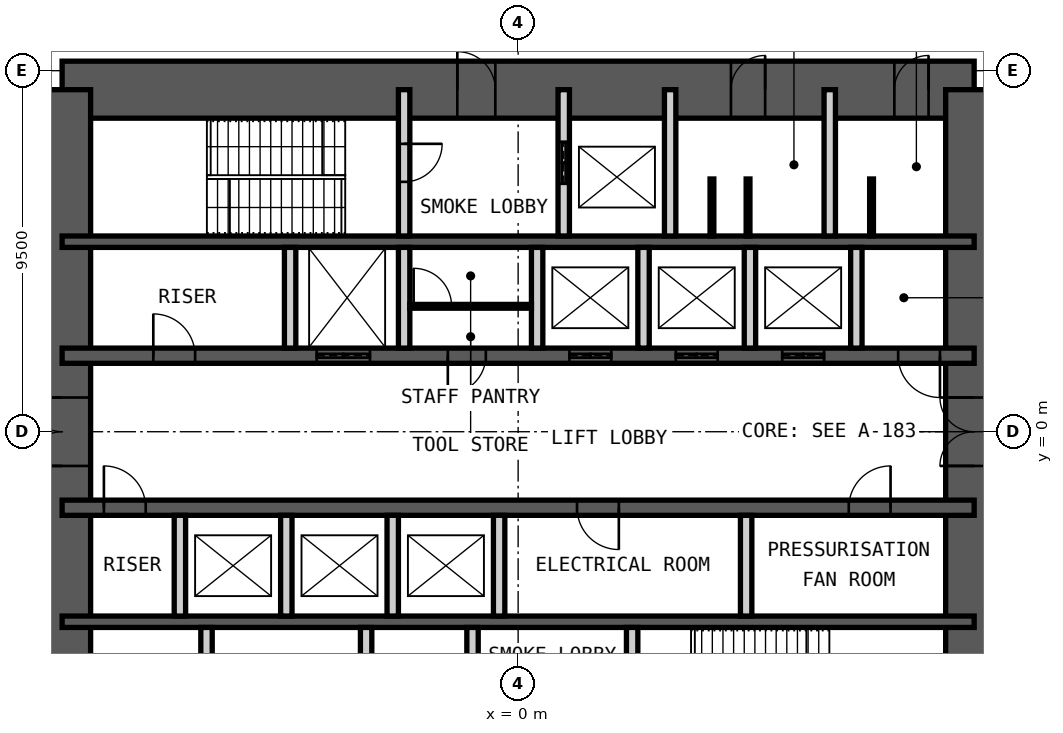
"""IFC4 building model, lengths in metres.
Left out: names, types, materials, properties, quantities, classifications, styles, units other than length and angle.
Written with IfcOpenShell. Run it as: python <this file> out.ifc"""

import sys

from ifc_helpers import new_model, si_unit, direction, frame, frame_2d, origin, place, context, subcontext, project, spatial, rectangle, extrude, element, fill, save


model = new_model("IFC4")
c1 = context("Model", 3, precision=1e-05, world=origin(), true_north=direction((0.0, 1.0)))
c2 = subcontext(c1, "Body", "Model", "MODEL_VIEW")
j1 = project(units=[si_unit("LENGTHUNIT", "METRE"), si_unit("PLANEANGLEUNIT", "RADIAN")], contexts=[c1])
p1 = place(None, origin())
s1 = spatial("IfcSite", under=j1, at=p1, CompositionType="ELEMENT")
p2 = place(p1, origin())
s2 = spatial("IfcBuilding", under=s1, at=p2, CompositionType="ELEMENT")
p3 = place(p2, frame((0.0, 0.0, 37.0)))
s3 = spatial("IfcBuildingStorey", under=s2, at=p3, CompositionType="ELEMENT", Elevation=37.0)
p4 = place(p3, frame((-12.0, 9.0, 0.0), z_axis=(0.0, 0.0, 1.0), x_axis=(1.0, 0.0, 0.0)))
e1 = element("IfcWall", 1, at=p4, inside=s3, PredefinedType="SHEAR", context=c2, shape_type="SweptSolid", body=[
    extrude(rectangle(XDim=24.0, YDim=1.5, at=frame_2d((12.0, 0.0))), origin(), (0.0, 0.0, 1.0), 5.0),
])
p5 = place(p4, frame((10.4, 0.0, 0.0)))
e2 = element("IfcOpeningElement", 2, at=p5, cuts=e1, PredefinedType="OPENING", context=c2, shape_type="SweptSolid", body=[
    extrude(rectangle(XDim=1.0, YDim=2.1, at=frame_2d((0.5, 1.05))), frame((0.0, 0.76, 0.0), z_axis=(0.0, -1.0, 0.0), x_axis=(1.0, 0.0, 0.0)), (0.0, 0.0, 1.0), 1.52),
])
p6 = place(p4, frame((17.6, 0.0, 0.0)))
e3 = element("IfcOpeningElement", 3, at=p6, cuts=e1, PredefinedType="OPENING", context=c2, shape_type="SweptSolid", body=[
    extrude(rectangle(XDim=0.9, YDim=2.1, at=frame_2d((0.45, 1.05))), frame((0.0, 0.76, 0.0), z_axis=(0.0, -1.0, 0.0), x_axis=(1.0, 0.0, 0.0)), (0.0, 0.0, 1.0), 1.52),
])
p7 = place(p4, frame((21.9, 0.0, 0.0)))
e4 = element("IfcOpeningElement", 4, at=p7, cuts=e1, PredefinedType="OPENING", context=c2, shape_type="SweptSolid", body=[
    extrude(rectangle(XDim=0.9, YDim=2.1, at=frame_2d((0.45, 1.05))), frame((0.0, 0.76, 0.0), z_axis=(0.0, -1.0, 0.0), x_axis=(1.0, 0.0, 0.0)), (0.0, 0.0, 1.0), 1.52),
])
p8 = place(p3, frame((12.0, -9.0, 0.0), z_axis=(0.0, 0.0, 1.0), x_axis=(0.0, 1.0, 0.0)))
e5 = element("IfcWall", 5, at=p8, inside=s3, PredefinedType="SHEAR", context=c2, shape_type="SweptSolid", body=[
    extrude(rectangle(XDim=18.0, YDim=1.5, at=frame_2d((9.0, 0.0))), origin(), (0.0, 0.0, 1.0), 5.0),
])
p9 = place(p8, frame((8.1, 0.0, 0.0)))
e6 = element("IfcOpeningElement", 6, at=p9, cuts=e5, PredefinedType="OPENING", context=c2, shape_type="SweptSolid", body=[
    extrude(rectangle(XDim=1.8, YDim=2.1, at=frame_2d((0.9, 1.05))), frame((0.0, 0.76, 0.0), z_axis=(0.0, -1.0, 0.0), x_axis=(1.0, 0.0, 0.0)), (0.0, 0.0, 1.0), 1.52),
])
p10 = place(p3, frame((-12.0, -9.0, 0.0), z_axis=(0.0, 0.0, 1.0), x_axis=(0.0, 1.0, 0.0)))
e7 = element("IfcWall", 7, at=p10, inside=s3, PredefinedType="SHEAR", context=c2, shape_type="SweptSolid", body=[
    extrude(rectangle(XDim=18.0, YDim=1.5, at=frame_2d((9.0, 0.0))), origin(), (0.0, 0.0, 1.0), 5.0),
])
p11 = place(p10, frame((8.1, 0.0, 0.0)))
e8 = element("IfcOpeningElement", 8, at=p11, cuts=e7, PredefinedType="OPENING", context=c2, shape_type="SweptSolid", body=[
    extrude(rectangle(XDim=1.8, YDim=2.1, at=frame_2d((0.9, 1.05))), frame((0.0, 0.76, 0.0), z_axis=(0.0, -1.0, 0.0), x_axis=(1.0, 0.0, 0.0)), (0.0, 0.0, 1.0), 1.52),
])
p12 = place(p3, frame((-12.0, 5.0, 0.0), z_axis=(0.0, 0.0, 1.0), x_axis=(1.0, 0.0, 0.0)))
e9 = element("IfcWall", 9, at=p12, inside=s3, PredefinedType="SHEAR", context=c2, shape_type="SweptSolid", body=[
    extrude(rectangle(XDim=24.0, YDim=0.3, at=frame_2d((12.0, 0.0))), origin(), (0.0, 0.0, 1.0), 5.0),
])
p13 = place(p3, frame((-12.0, 2.0, 0.0), z_axis=(0.0, 0.0, 1.0), x_axis=(1.0, 0.0, 0.0)))
e10 = element("IfcWall", 10, at=p13, inside=s3, PredefinedType="SHEAR", context=c2, shape_type="SweptSolid", body=[
    extrude(rectangle(XDim=24.0, YDim=0.4, at=frame_2d((12.0, 0.0))), origin(), (0.0, 0.0, 1.0), 5.0),
])
p14 = place(p13, frame((2.4, 0.0, 0.0)))
e11 = element("IfcOpeningElement", 11, at=p14, cuts=e10, PredefinedType="OPENING", context=c2, shape_type="SweptSolid", body=[
    extrude(rectangle(XDim=1.1, YDim=2.1, at=frame_2d((0.55, 1.05))), frame((0.0, 0.21, 0.0), z_axis=(0.0, -1.0, 0.0), x_axis=(1.0, 0.0, 0.0)), (0.0, 0.0, 1.0), 0.42),
])
p15 = place(p13, frame((22.0, 0.0, 0.0)))
e12 = element("IfcOpeningElement", 12, at=p15, cuts=e10, PredefinedType="OPENING", context=c2, shape_type="SweptSolid", body=[
    extrude(rectangle(XDim=1.1, YDim=2.1, at=frame_2d((0.55, 1.05))), frame((0.0, 0.21, 0.0), z_axis=(0.0, -1.0, 0.0), x_axis=(1.0, 0.0, 0.0)), (0.0, 0.0, 1.0), 0.42),
])
p16 = place(p13, frame((10.15, 0.0, 0.0)))
e13 = element("IfcOpeningElement", 13, at=p16, cuts=e10, PredefinedType="OPENING", context=c2, shape_type="SweptSolid", body=[
    extrude(rectangle(XDim=1.0, YDim=2.1, at=frame_2d((0.5, 1.05))), frame((0.0, 0.21, 0.0), z_axis=(0.0, -1.0, 0.0), x_axis=(1.0, 0.0, 0.0)), (0.0, 0.0, 1.0), 0.42),
])
p17 = place(p13, frame((6.7, 0.0, 0.0)))
e14 = element("IfcOpeningElement", 14, at=p17, cuts=e10, PredefinedType="OPENING", context=c2, shape_type="SweptSolid", body=[
    extrude(rectangle(XDim=1.4, YDim=2.4, at=frame_2d((0.7, 1.2))), frame((0.0, 0.21, 0.0), z_axis=(0.0, -1.0, 0.0), x_axis=(1.0, 0.0, 0.0)), (0.0, 0.0, 1.0), 0.42),
])
p18 = place(p13, frame((13.35, 0.0, 0.0)))
e15 = element("IfcOpeningElement", 15, at=p18, cuts=e10, PredefinedType="OPENING", context=c2, shape_type="SweptSolid", body=[
    extrude(rectangle(XDim=1.1, YDim=2.4, at=frame_2d((0.55, 1.2))), frame((0.0, 0.21, 0.0), z_axis=(0.0, -1.0, 0.0), x_axis=(1.0, 0.0, 0.0)), (0.0, 0.0, 1.0), 0.42),
])
p19 = place(p13, frame((16.15, 0.0, 0.0)))
e16 = element("IfcOpeningElement", 16, at=p19, cuts=e10, PredefinedType="OPENING", context=c2, shape_type="SweptSolid", body=[
    extrude(rectangle(XDim=1.1, YDim=2.4, at=frame_2d((0.55, 1.2))), frame((0.0, 0.21, 0.0), z_axis=(0.0, -1.0, 0.0), x_axis=(1.0, 0.0, 0.0)), (0.0, 0.0, 1.0), 0.42),
])
p20 = place(p13, frame((18.95, 0.0, 0.0)))
e17 = element("IfcOpeningElement", 17, at=p20, cuts=e10, PredefinedType="OPENING", context=c2, shape_type="SweptSolid", body=[
    extrude(rectangle(XDim=1.1, YDim=2.4, at=frame_2d((0.55, 1.2))), frame((0.0, 0.21, 0.0), z_axis=(0.0, -1.0, 0.0), x_axis=(1.0, 0.0, 0.0)), (0.0, 0.0, 1.0), 0.42),
])
p21 = place(p3, frame((-12.0, -2.0, 0.0), z_axis=(0.0, 0.0, 1.0), x_axis=(1.0, 0.0, 0.0)))
e18 = element("IfcWall", 18, at=p21, inside=s3, PredefinedType="SHEAR", context=c2, shape_type="SweptSolid", body=[
    extrude(rectangle(XDim=24.0, YDim=0.4, at=frame_2d((12.0, 0.0))), origin(), (0.0, 0.0, 1.0), 5.0),
])
p22 = place(p21, frame((1.1, 0.0, 0.0)))
e19 = element("IfcOpeningElement", 19, at=p22, cuts=e18, PredefinedType="OPENING", context=c2, shape_type="SweptSolid", body=[
    extrude(rectangle(XDim=1.1, YDim=2.1, at=frame_2d((0.55, 1.05))), frame((0.0, 0.21, 0.0), z_axis=(0.0, -1.0, 0.0), x_axis=(1.0, 0.0, 0.0)), (0.0, 0.0, 1.0), 0.42),
])
p23 = place(p21, frame((13.55, 0.0, 0.0)))
e20 = element("IfcOpeningElement", 20, at=p23, cuts=e18, PredefinedType="OPENING", context=c2, shape_type="SweptSolid", body=[
    extrude(rectangle(XDim=1.1, YDim=2.1, at=frame_2d((0.55, 1.05))), frame((0.0, 0.21, 0.0), z_axis=(0.0, -1.0, 0.0), x_axis=(1.0, 0.0, 0.0)), (0.0, 0.0, 1.0), 0.42),
])
p24 = place(p21, frame((20.7, 0.0, 0.0)))
e21 = element("IfcOpeningElement", 21, at=p24, cuts=e18, PredefinedType="OPENING", context=c2, shape_type="SweptSolid", body=[
    extrude(rectangle(XDim=1.1, YDim=2.1, at=frame_2d((0.55, 1.05))), frame((0.0, 0.21, 0.0), z_axis=(0.0, -1.0, 0.0), x_axis=(1.0, 0.0, 0.0)), (0.0, 0.0, 1.0), 0.42),
])
p25 = place(p3, frame((-12.0, -5.0, 0.0), z_axis=(0.0, 0.0, 1.0), x_axis=(1.0, 0.0, 0.0)))
e22 = element("IfcWall", 22, at=p25, inside=s3, PredefinedType="SHEAR", context=c2, shape_type="SweptSolid", body=[
    extrude(rectangle(XDim=24.0, YDim=0.3, at=frame_2d((12.0, 0.0))), origin(), (0.0, 0.0, 1.0), 5.0),
])
p26 = place(p3, frame((-3.0, 5.15, 0.0), z_axis=(0.0, 0.0, 1.0), x_axis=(0.0, 1.0, 0.0)))
e23 = element("IfcWall", 23, at=p26, inside=s3, PredefinedType="PARTITIONING", context=c2, shape_type="SweptSolid", body=[
    extrude(rectangle(XDim=3.85, YDim=0.3, at=frame_2d((1.925, 0.0))), origin(), (0.0, 0.0, 1.0), 4.78),
])
p27 = place(p26, frame((1.425, 0.0, 0.0)))
e24 = element("IfcOpeningElement", 24, at=p27, cuts=e23, PredefinedType="OPENING", context=c2, shape_type="SweptSolid", body=[
    extrude(rectangle(XDim=1.0, YDim=2.1, at=frame_2d((0.5, 1.05))), frame((0.0, 0.16, 0.0), z_axis=(0.0, -1.0, 0.0), x_axis=(1.0, 0.0, 0.0)), (0.0, 0.0, 1.0), 0.32),
])
p28 = place(p3, frame((1.2, 5.15, 0.0), z_axis=(0.0, 0.0, 1.0), x_axis=(0.0, 1.0, 0.0)))
e25 = element("IfcWall", 25, at=p28, inside=s3, PredefinedType="PARTITIONING", context=c2, shape_type="SweptSolid", body=[
    extrude(rectangle(XDim=3.85, YDim=0.3, at=frame_2d((1.925, 0.0))), origin(), (0.0, 0.0, 1.0), 4.78),
])
p29 = place(p28, frame((1.375, 0.0, 0.0)))
e26 = element("IfcOpeningElement", 26, at=p29, cuts=e25, PredefinedType="OPENING", context=c2, shape_type="SweptSolid", body=[
    extrude(rectangle(XDim=1.1, YDim=2.4, at=frame_2d((0.55, 1.2))), frame((0.0, 0.16, 0.0), z_axis=(0.0, -1.0, 0.0), x_axis=(1.0, 0.0, 0.0)), (0.0, 0.0, 1.0), 0.32),
])
for number, where, z_axis, x_axis in (
    (27, (4.0, 5.15, 0.0), (0.0, 0.0, 1.0), (0.0, 1.0, 0.0)),
    (28, (8.2, 5.15, 0.0), (0.0, 0.0, 1.0), (0.0, 1.0, 0.0)),
):
    element("IfcWall", number, at=place(p3, frame(where, z_axis=z_axis, x_axis=x_axis)), inside=s3, PredefinedType="PARTITIONING", context=c2, shape_type="SweptSolid", body=[
        extrude(rectangle(XDim=3.85, YDim=0.3, at=frame_2d((1.925, 0.0))), origin(), (0.0, 0.0, 1.0), 4.78),
    ])
for number, where, z_axis, x_axis in (
    (29, (-6.0, 2.2, 0.0), (0.0, 0.0, 1.0), (0.0, 1.0, 0.0)),
    (30, (-3.0, 2.2, 0.0), (0.0, 0.0, 1.0), (0.0, 1.0, 0.0)),
    (31, (0.5, 2.2, 0.0), (0.0, 0.0, 1.0), (0.0, 1.0, 0.0)),
    (32, (3.3, 2.2, 0.0), (0.0, 0.0, 1.0), (0.0, 1.0, 0.0)),
    (33, (6.1, 2.2, 0.0), (0.0, 0.0, 1.0), (0.0, 1.0, 0.0)),
    (34, (8.9, 2.2, 0.0), (0.0, 0.0, 1.0), (0.0, 1.0, 0.0)),
    (35, (-8.9, -4.85, 0.0), (0.0, 0.0, 1.0), (0.0, 1.0, 0.0)),
    (36, (-6.1, -4.85, 0.0), (0.0, 0.0, 1.0), (0.0, 1.0, 0.0)),
    (37, (-3.3, -4.85, 0.0), (0.0, 0.0, 1.0), (0.0, 1.0, 0.0)),
    (38, (-0.5, -4.85, 0.0), (0.0, 0.0, 1.0), (0.0, 1.0, 0.0)),
    (39, (6.0, -4.85, 0.0), (0.0, 0.0, 1.0), (0.0, 1.0, 0.0)),
):
    element("IfcWall", number, at=place(p3, frame(where, z_axis=z_axis, x_axis=x_axis)), inside=s3, PredefinedType="PARTITIONING", context=c2, shape_type="SweptSolid", body=[
        extrude(rectangle(XDim=2.65, YDim=0.3, at=frame_2d((1.325, 0.0))), origin(), (0.0, 0.0, 1.0), 4.78),
    ])
for number, where, z_axis, x_axis in (
    (40, (-8.2, -9.0, 0.0), (0.0, 0.0, 1.0), (0.0, 1.0, 0.0)),
    (41, (-4.0, -9.0, 0.0), (0.0, 0.0, 1.0), (0.0, 1.0, 0.0)),
):
    element("IfcWall", number, at=place(p3, frame(where, z_axis=z_axis, x_axis=x_axis)), inside=s3, PredefinedType="PARTITIONING", context=c2, shape_type="SweptSolid", body=[
        extrude(rectangle(XDim=3.85, YDim=0.3, at=frame_2d((1.925, 0.0))), origin(), (0.0, 0.0, 1.0), 4.78),
    ])
p30 = place(p3, frame((-1.2, -9.0, 0.0), z_axis=(0.0, 0.0, 1.0), x_axis=(0.0, 1.0, 0.0)))
e42 = element("IfcWall", 42, at=p30, inside=s3, PredefinedType="PARTITIONING", context=c2, shape_type="SweptSolid", body=[
    extrude(rectangle(XDim=3.85, YDim=0.3, at=frame_2d((1.925, 0.0))), origin(), (0.0, 0.0, 1.0), 4.78),
])
p31 = place(p30, frame((1.375, 0.0, 0.0)))
e43 = element("IfcOpeningElement", 43, at=p31, cuts=e42, PredefinedType="OPENING", context=c2, shape_type="SweptSolid", body=[
    extrude(rectangle(XDim=1.1, YDim=2.4, at=frame_2d((0.55, 1.2))), frame((0.0, 0.16, 0.0), z_axis=(0.0, -1.0, 0.0), x_axis=(1.0, 0.0, 0.0)), (0.0, 0.0, 1.0), 0.32),
])
p32 = place(p3, frame((3.0, -9.0, 0.0), z_axis=(0.0, 0.0, 1.0), x_axis=(0.0, 1.0, 0.0)))
e44 = element("IfcWall", 44, at=p32, inside=s3, PredefinedType="PARTITIONING", context=c2, shape_type="SweptSolid", body=[
    extrude(rectangle(XDim=3.85, YDim=0.3, at=frame_2d((1.925, 0.0))), origin(), (0.0, 0.0, 1.0), 4.78),
])
p33 = place(p32, frame((1.425, 0.0, 0.0)))
e45 = element("IfcOpeningElement", 45, at=p33, cuts=e44, PredefinedType="OPENING", context=c2, shape_type="SweptSolid", body=[
    extrude(rectangle(XDim=1.0, YDim=2.1, at=frame_2d((0.5, 1.05))), frame((0.0, 0.16, 0.0), z_axis=(0.0, -1.0, 0.0), x_axis=(1.0, 0.0, 0.0)), (0.0, 0.0, 1.0), 0.32),
])
p34 = place(p3, frame((-2.85, 3.3, 0.0), z_axis=(0.0, 0.0, 1.0), x_axis=(1.0, 0.0, 0.0)))
e46 = element("IfcWall", 46, at=p34, inside=s3, PredefinedType="PARTITIONING", context=c2, shape_type="SweptSolid", body=[
    extrude(rectangle(XDim=3.2, YDim=0.1, at=frame_2d((1.6, 0.0))), origin(), (0.0, 0.0, 1.0), 4.78),
])
p35 = place(p34, frame((0.1, 0.0, 0.0)))
e47 = element("IfcOpeningElement", 47, at=p35, cuts=e46, PredefinedType="OPENING", context=c2, shape_type="SweptSolid", body=[
    extrude(rectangle(XDim=1.0, YDim=2.4, at=frame_2d((0.5, 1.2))), frame((0.0, 0.06, 0.0), z_axis=(0.0, -1.0, 0.0), x_axis=(1.0, 0.0, 0.0)), (0.0, 0.0, 1.0), 0.12),
])
for number, where, z_axis, x_axis in (
    (48, (5.1, 5.15, 0.0), (0.0, 0.0, 1.0), (0.0, 1.0, 0.0)),
    (49, (6.05, 5.15, 0.0), (0.0, 0.0, 1.0), (0.0, 1.0, 0.0)),
    (50, (9.3, 5.15, 0.0), (0.0, 0.0, 1.0), (0.0, 1.0, 0.0)),
):
    element("IfcWall", number, at=place(p3, frame(where, z_axis=z_axis, x_axis=x_axis)), inside=s3, PredefinedType="PARTITIONING", context=c2, shape_type="SweptSolid", body=[
        extrude(rectangle(XDim=1.5, YDim=0.1, at=frame_2d((0.75, 0.0))), origin(), (0.0, 0.0, 1.0), 2.1),
    ])
p36 = place(p5, origin())
e51 = element("IfcDoor", 51, at=p36, inside=s3, OperationType="SINGLE_SWING_RIGHT", PredefinedType="DOOR", context=c2, shape_type="SweptSolid", body=[
    extrude(rectangle(XDim=1.0, YDim=2.1, at=frame_2d((0.5, 1.05))), frame((0.0, 0.025, 0.0), z_axis=(0.0, -1.0, 0.0), x_axis=(1.0, 0.0, 0.0)), (0.0, 0.0, 1.0), 0.05),
])
fill(e2, e51)
p37 = place(p6, origin())
e52 = element("IfcDoor", 52, at=p37, inside=s3, OperationType="SINGLE_SWING_LEFT", PredefinedType="DOOR", context=c2, shape_type="SweptSolid", body=[
    extrude(rectangle(XDim=0.9, YDim=2.1, at=frame_2d((0.45, 1.05))), frame((0.0, 0.025, 0.0), z_axis=(0.0, -1.0, 0.0), x_axis=(1.0, 0.0, 0.0)), (0.0, 0.0, 1.0), 0.05),
])
fill(e3, e52)
p38 = place(p7, origin())
e53 = element("IfcDoor", 53, at=p38, inside=s3, OperationType="SINGLE_SWING_LEFT", PredefinedType="DOOR", context=c2, shape_type="SweptSolid", body=[
    extrude(rectangle(XDim=0.9, YDim=2.1, at=frame_2d((0.45, 1.05))), frame((0.0, 0.025, 0.0), z_axis=(0.0, -1.0, 0.0), x_axis=(1.0, 0.0, 0.0)), (0.0, 0.0, 1.0), 0.05),
])
fill(e4, e53)
p39 = place(p27, origin())
e54 = element("IfcDoor", 54, at=p39, inside=s3, OperationType="SINGLE_SWING_RIGHT", PredefinedType="DOOR", context=c2, shape_type="SweptSolid", body=[
    extrude(rectangle(XDim=1.0, YDim=2.1, at=frame_2d((0.5, 1.05))), frame((0.0, 0.025, 0.0), z_axis=(0.0, -1.0, 0.0), x_axis=(1.0, 0.0, 0.0)), (0.0, 0.0, 1.0), 0.05),
])
fill(e24, e54)
p40 = place(p14, origin())
e55 = element("IfcDoor", 55, at=p40, inside=s3, OperationType="SINGLE_SWING_RIGHT", PredefinedType="DOOR", context=c2, shape_type="SweptSolid", body=[
    extrude(rectangle(XDim=1.1, YDim=2.1, at=frame_2d((0.55, 1.05))), frame((0.0, 0.025, 0.0), z_axis=(0.0, -1.0, 0.0), x_axis=(1.0, 0.0, 0.0)), (0.0, 0.0, 1.0), 0.05),
])
fill(e11, e55)
p41 = place(p22, origin())
e56 = element("IfcDoor", 56, at=p41, inside=s3, OperationType="SINGLE_SWING_RIGHT", PredefinedType="DOOR", context=c2, shape_type="SweptSolid", body=[
    extrude(rectangle(XDim=1.1, YDim=2.1, at=frame_2d((0.55, 1.05))), frame((0.0, 0.025, 0.0), z_axis=(0.0, -1.0, 0.0), x_axis=(1.0, 0.0, 0.0)), (0.0, 0.0, 1.0), 0.05),
])
fill(e19, e56)
p42 = place(p15, origin())
e57 = element("IfcDoor", 57, at=p42, inside=s3, OperationType="SINGLE_SWING_RIGHT", PredefinedType="DOOR", context=c2, shape_type="SweptSolid", body=[
    extrude(rectangle(XDim=1.1, YDim=2.1, at=frame_2d((0.55, 1.05))), frame((0.0, 0.025, 0.0), z_axis=(0.0, -1.0, 0.0), x_axis=(1.0, 0.0, 0.0)), (0.0, 0.0, 1.0), 0.05),
])
fill(e12, e57)
p43 = place(p16, origin())
e58 = element("IfcDoor", 58, at=p43, inside=s3, OperationType="SINGLE_SWING_LEFT", PredefinedType="DOOR", context=c2, shape_type="SweptSolid", body=[
    extrude(rectangle(XDim=1.0, YDim=2.1, at=frame_2d((0.5, 1.05))), frame((0.0, 0.025, 0.0), z_axis=(0.0, -1.0, 0.0), x_axis=(1.0, 0.0, 0.0)), (0.0, 0.0, 1.0), 0.05),
])
fill(e13, e58)
p44 = place(p23, origin())
e59 = element("IfcDoor", 59, at=p44, inside=s3, OperationType="SINGLE_SWING_RIGHT", PredefinedType="DOOR", context=c2, shape_type="SweptSolid", body=[
    extrude(rectangle(XDim=1.1, YDim=2.1, at=frame_2d((0.55, 1.05))), frame((0.0, 0.025, 0.0), z_axis=(0.0, -1.0, 0.0), x_axis=(1.0, 0.0, 0.0)), (0.0, 0.0, 1.0), 0.05),
])
fill(e20, e59)
p45 = place(p24, origin())
e60 = element("IfcDoor", 60, at=p45, inside=s3, OperationType="SINGLE_SWING_LEFT", PredefinedType="DOOR", context=c2, shape_type="SweptSolid", body=[
    extrude(rectangle(XDim=1.1, YDim=2.1, at=frame_2d((0.55, 1.05))), frame((0.0, 0.025, 0.0), z_axis=(0.0, -1.0, 0.0), x_axis=(1.0, 0.0, 0.0)), (0.0, 0.0, 1.0), 0.05),
])
fill(e21, e60)
p46 = place(p9, origin())
e61 = element("IfcDoor", 61, at=p46, inside=s3, OperationType="DOUBLE_DOOR_DOUBLE_SWING", PredefinedType="DOOR", context=c2, shape_type="SweptSolid", body=[
    extrude(rectangle(XDim=1.8, YDim=2.1, at=frame_2d((0.9, 1.05))), frame((0.0, 0.025, 0.0), z_axis=(0.0, -1.0, 0.0), x_axis=(1.0, 0.0, 0.0)), (0.0, 0.0, 1.0), 0.05),
])
fill(e6, e61)
p47 = place(p11, origin())
e62 = element("IfcDoor", 62, at=p47, inside=s3, OperationType="DOUBLE_DOOR_DOUBLE_SWING", PredefinedType="DOOR", context=c2, shape_type="SweptSolid", body=[
    extrude(rectangle(XDim=1.8, YDim=2.1, at=frame_2d((0.9, 1.05))), frame((0.0, 0.025, 0.0), z_axis=(0.0, -1.0, 0.0), x_axis=(1.0, 0.0, 0.0)), (0.0, 0.0, 1.0), 0.05),
])
fill(e8, e62)
p48 = place(p29, origin())
e63 = element("IfcDoor", 63, at=p48, inside=s3, OperationType="DOUBLE_DOOR_SLIDING", PredefinedType="DOOR", context=c2, shape_type="SweptSolid", body=[
    extrude(rectangle(XDim=1.1, YDim=2.4, at=frame_2d((0.55, 1.2))), frame((0.0, 0.025, 0.0), z_axis=(0.0, -1.0, 0.0), x_axis=(1.0, 0.0, 0.0)), (0.0, 0.0, 1.0), 0.05),
])
fill(e26, e63)
p49 = place(p17, origin())
e64 = element("IfcDoor", 64, at=p49, inside=s3, OperationType="DOUBLE_DOOR_SLIDING", PredefinedType="DOOR", context=c2, shape_type="SweptSolid", body=[
    extrude(rectangle(XDim=1.4, YDim=2.4, at=frame_2d((0.7, 1.2))), frame((0.0, 0.025, 0.0), z_axis=(0.0, -1.0, 0.0), x_axis=(1.0, 0.0, 0.0)), (0.0, 0.0, 1.0), 0.05),
])
fill(e14, e64)
p50 = place(p18, origin())
e65 = element("IfcDoor", 65, at=p50, inside=s3, OperationType="DOUBLE_DOOR_SLIDING", PredefinedType="DOOR", context=c2, shape_type="SweptSolid", body=[
    extrude(rectangle(XDim=1.1, YDim=2.4, at=frame_2d((0.55, 1.2))), frame((0.0, 0.025, 0.0), z_axis=(0.0, -1.0, 0.0), x_axis=(1.0, 0.0, 0.0)), (0.0, 0.0, 1.0), 0.05),
])
fill(e15, e65)
p51 = place(p19, origin())
e66 = element("IfcDoor", 66, at=p51, inside=s3, OperationType="DOUBLE_DOOR_SLIDING", PredefinedType="DOOR", context=c2, shape_type="SweptSolid", body=[
    extrude(rectangle(XDim=1.1, YDim=2.4, at=frame_2d((0.55, 1.2))), frame((0.0, 0.025, 0.0), z_axis=(0.0, -1.0, 0.0), x_axis=(1.0, 0.0, 0.0)), (0.0, 0.0, 1.0), 0.05),
])
fill(e16, e66)
p52 = place(p20, origin())
e67 = element("IfcDoor", 67, at=p52, inside=s3, OperationType="DOUBLE_DOOR_SLIDING", PredefinedType="DOOR", context=c2, shape_type="SweptSolid", body=[
    extrude(rectangle(XDim=1.1, YDim=2.4, at=frame_2d((0.55, 1.2))), frame((0.0, 0.025, 0.0), z_axis=(0.0, -1.0, 0.0), x_axis=(1.0, 0.0, 0.0)), (0.0, 0.0, 1.0), 0.05),
])
fill(e17, e67)
p53 = place(p35, origin())
e68 = element("IfcDoor", 68, at=p53, inside=s3, OperationType="SINGLE_SWING_RIGHT", PredefinedType="DOOR", context=c2, shape_type="SweptSolid", body=[
    extrude(rectangle(XDim=1.0, YDim=2.4, at=frame_2d((0.5, 1.2))), frame((0.0, 0.025, 0.0), z_axis=(0.0, -1.0, 0.0), x_axis=(1.0, 0.0, 0.0)), (0.0, 0.0, 1.0), 0.05),
])
fill(e47, e68)
save(model, sys.argv[1])
